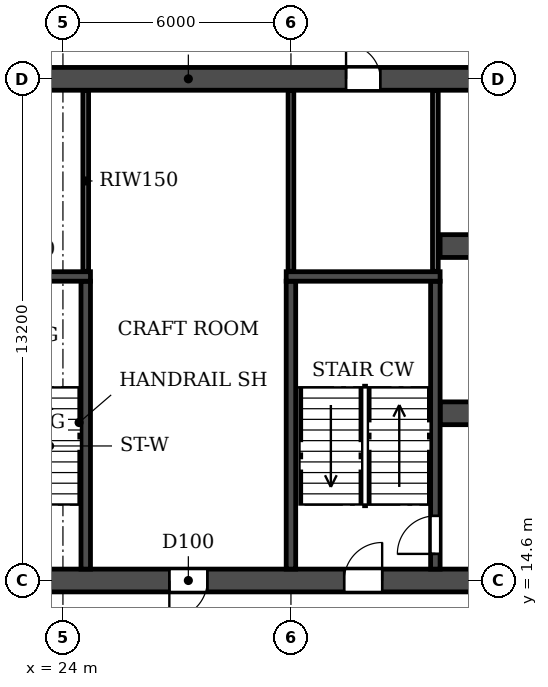
"""IFC4 building model, lengths in metres.
Left out: names, types, materials, properties, quantities, classifications, styles, units other than length and angle.
Written with IfcOpenShell. Run it as: python <this file> out.ifc"""

import sys

from ifc_helpers import new_model, si_unit, direction, frame, frame_2d, origin, place, context, subcontext, project, spatial, rectangle, extrude, element, fill, save


model = new_model("IFC4")
c1 = context("Model", 3, precision=1e-05, world=origin(), true_north=direction((0.0, 1.0)))
c2 = subcontext(c1, "Body", "Model", "MODEL_VIEW")
j1 = project(units=[si_unit("LENGTHUNIT", "METRE"), si_unit("PLANEANGLEUNIT", "RADIAN")], contexts=[c1])
p1 = place(None, origin())
s1 = spatial("IfcSite", under=j1, at=p1, CompositionType="ELEMENT")
p2 = place(p1, origin())
s2 = spatial("IfcBuilding", under=s1, at=p2, CompositionType="ELEMENT")
p3 = place(p2, frame((0.0, 0.0, 49.8)))
s3 = spatial("IfcBuildingStorey", under=s2, at=p3, CompositionType="ELEMENT", Elevation=49.8)
p4 = place(p3, frame((2.6, 14.6, 0.0), z_axis=(0.0, 0.0, 1.0), x_axis=(1.0, 0.0, 0.0)))
e1 = element("IfcWall", 1, at=p4, inside=s3, PredefinedType="SOLIDWALL", context=c2, shape_type="SweptSolid", body=[
    extrude(rectangle(XDim=96.8, YDim=0.6, at=frame_2d((48.4, 0.0))), origin(), (0.0, 0.0, 1.0), 3.0),
])
p5 = place(p4, frame((3.05, 0.0, 0.0)))
e2 = element("IfcOpeningElement", 2, at=p5, cuts=e1, PredefinedType="OPENING", context=c2, shape_type="SweptSolid", body=[
    extrude(rectangle(XDim=1.5, YDim=2.1, at=frame_2d((0.75, 1.05))), frame((0.0, 0.31, 0.0), z_axis=(0.0, -1.0, 0.0), x_axis=(1.0, 0.0, 0.0)), (0.0, 0.0, 1.0), 0.62),
])
p6 = place(p4, frame((10.75, 0.0, 0.0)))
e3 = element("IfcOpeningElement", 3, at=p6, cuts=e1, PredefinedType="OPENING", context=c2, shape_type="SweptSolid", body=[
    extrude(rectangle(XDim=1.5, YDim=2.1, at=frame_2d((0.75, 1.05))), frame((0.0, 0.31, 0.0), z_axis=(0.0, -1.0, 0.0), x_axis=(1.0, 0.0, 0.0)), (0.0, 0.0, 1.0), 0.62),
])
p7 = place(p4, frame((16.3, 0.0, 0.0)))
e4 = element("IfcOpeningElement", 4, at=p7, cuts=e1, PredefinedType="OPENING", context=c2, shape_type="SweptSolid", body=[
    extrude(rectangle(XDim=1.0, YDim=2.1, at=frame_2d((0.5, 1.05))), frame((0.0, 0.31, 0.0), z_axis=(0.0, -1.0, 0.0), x_axis=(1.0, 0.0, 0.0)), (0.0, 0.0, 1.0), 0.62),
])
p8 = place(p4, frame((24.2, 0.0, 0.0)))
e5 = element("IfcOpeningElement", 5, at=p8, cuts=e1, PredefinedType="OPENING", context=c2, shape_type="SweptSolid", body=[
    extrude(rectangle(XDim=1.0, YDim=2.1, at=frame_2d((0.5, 1.05))), frame((0.0, 0.31, 0.0), z_axis=(0.0, -1.0, 0.0), x_axis=(1.0, 0.0, 0.0)), (0.0, 0.0, 1.0), 0.62),
])
p9 = place(p4, frame((28.8, 0.0, 0.0)))
e6 = element("IfcOpeningElement", 6, at=p9, cuts=e1, PredefinedType="OPENING", context=c2, shape_type="SweptSolid", body=[
    extrude(rectangle(XDim=1.0, YDim=2.1, at=frame_2d((0.5, 1.05))), frame((0.0, 0.31, 0.0), z_axis=(0.0, -1.0, 0.0), x_axis=(1.0, 0.0, 0.0)), (0.0, 0.0, 1.0), 0.62),
])
p10 = place(p4, frame((42.7, 0.0, 0.0)))
e7 = element("IfcOpeningElement", 7, at=p10, cuts=e1, PredefinedType="OPENING", context=c2, shape_type="SweptSolid", body=[
    extrude(rectangle(XDim=1.0, YDim=2.1, at=frame_2d((0.5, 1.05))), frame((0.0, 0.31, 0.0), z_axis=(0.0, -1.0, 0.0), x_axis=(1.0, 0.0, 0.0)), (0.0, 0.0, 1.0), 0.62),
])
p11 = place(p4, frame((47.9, 0.0, 0.0)))
e8 = element("IfcOpeningElement", 8, at=p11, cuts=e1, PredefinedType="OPENING", context=c2, shape_type="SweptSolid", body=[
    extrude(rectangle(XDim=1.0, YDim=2.1, at=frame_2d((0.5, 1.05))), frame((0.0, 0.31, 0.0), z_axis=(0.0, -1.0, 0.0), x_axis=(1.0, 0.0, 0.0)), (0.0, 0.0, 1.0), 0.62),
])
p12 = place(p4, frame((51.8, 0.0, 0.0)))
e9 = element("IfcOpeningElement", 9, at=p12, cuts=e1, PredefinedType="OPENING", context=c2, shape_type="SweptSolid", body=[
    extrude(rectangle(XDim=1.0, YDim=2.1, at=frame_2d((0.5, 1.05))), frame((0.0, 0.31, 0.0), z_axis=(0.0, -1.0, 0.0), x_axis=(1.0, 0.0, 0.0)), (0.0, 0.0, 1.0), 0.62),
])
p13 = place(p4, frame((55.7, 0.0, 0.0)))
e10 = element("IfcOpeningElement", 10, at=p13, cuts=e1, PredefinedType="OPENING", context=c2, shape_type="SweptSolid", body=[
    extrude(rectangle(XDim=1.0, YDim=2.1, at=frame_2d((0.5, 1.05))), frame((0.0, 0.31, 0.0), z_axis=(0.0, -1.0, 0.0), x_axis=(1.0, 0.0, 0.0)), (0.0, 0.0, 1.0), 0.62),
])
p14 = place(p4, frame((67.0, 0.0, 0.0)))
e11 = element("IfcOpeningElement", 11, at=p14, cuts=e1, PredefinedType="OPENING", context=c2, shape_type="SweptSolid", body=[
    extrude(rectangle(XDim=1.0, YDim=2.1, at=frame_2d((0.5, 1.05))), frame((0.0, 0.31, 0.0), z_axis=(0.0, -1.0, 0.0), x_axis=(1.0, 0.0, 0.0)), (0.0, 0.0, 1.0), 0.62),
])
p15 = place(p4, frame((71.6, 0.0, 0.0)))
e12 = element("IfcOpeningElement", 12, at=p15, cuts=e1, PredefinedType="OPENING", context=c2, shape_type="SweptSolid", body=[
    extrude(rectangle(XDim=1.0, YDim=2.1, at=frame_2d((0.5, 1.05))), frame((0.0, 0.31, 0.0), z_axis=(0.0, -1.0, 0.0), x_axis=(1.0, 0.0, 0.0)), (0.0, 0.0, 1.0), 0.62),
])
p16 = place(p4, frame((79.5, 0.0, 0.0)))
e13 = element("IfcOpeningElement", 13, at=p16, cuts=e1, PredefinedType="OPENING", context=c2, shape_type="SweptSolid", body=[
    extrude(rectangle(XDim=1.0, YDim=2.1, at=frame_2d((0.5, 1.05))), frame((0.0, 0.31, 0.0), z_axis=(0.0, -1.0, 0.0), x_axis=(1.0, 0.0, 0.0)), (0.0, 0.0, 1.0), 0.62),
])
p17 = place(p4, frame((84.05, 0.0, 0.0)))
e14 = element("IfcOpeningElement", 14, at=p17, cuts=e1, PredefinedType="OPENING", context=c2, shape_type="SweptSolid", body=[
    extrude(rectangle(XDim=1.0, YDim=2.1, at=frame_2d((0.5, 1.05))), frame((0.0, 0.31, 0.0), z_axis=(0.0, -1.0, 0.0), x_axis=(1.0, 0.0, 0.0)), (0.0, 0.0, 1.0), 0.62),
])
p18 = place(p4, frame((91.75, 0.0, 0.0)))
e15 = element("IfcOpeningElement", 15, at=p18, cuts=e1, PredefinedType="OPENING", context=c2, shape_type="SweptSolid", body=[
    extrude(rectangle(XDim=1.0, YDim=2.1, at=frame_2d((0.5, 1.05))), frame((0.0, 0.31, 0.0), z_axis=(0.0, -1.0, 0.0), x_axis=(1.0, 0.0, 0.0)), (0.0, 0.0, 1.0), 0.62),
])
p19 = place(p3, frame((2.6, 27.8, 0.0), z_axis=(0.0, 0.0, 1.0), x_axis=(1.0, 0.0, 0.0)))
e16 = element("IfcWall", 16, at=p19, inside=s3, PredefinedType="SOLIDWALL", context=c2, shape_type="SweptSolid", body=[
    extrude(rectangle(XDim=96.8, YDim=0.6, at=frame_2d((48.4, 0.0))), origin(), (0.0, 0.0, 1.0), 3.0),
])
p20 = place(p19, frame((7.2, 0.0, 0.0)))
e17 = element("IfcOpeningElement", 17, at=p20, cuts=e16, PredefinedType="OPENING", context=c2, shape_type="SweptSolid", body=[
    extrude(rectangle(XDim=1.0, YDim=2.1, at=frame_2d((0.5, 1.05))), frame((0.0, 0.31, 0.0), z_axis=(0.0, -1.0, 0.0), x_axis=(1.0, 0.0, 0.0)), (0.0, 0.0, 1.0), 0.62),
])
p21 = place(p19, frame((16.3, 0.0, 0.0)))
e18 = element("IfcOpeningElement", 18, at=p21, cuts=e16, PredefinedType="OPENING", context=c2, shape_type="SweptSolid", body=[
    extrude(rectangle(XDim=1.0, YDim=2.1, at=frame_2d((0.5, 1.05))), frame((0.0, 0.31, 0.0), z_axis=(0.0, -1.0, 0.0), x_axis=(1.0, 0.0, 0.0)), (0.0, 0.0, 1.0), 0.62),
])
p22 = place(p19, frame((19.65, 0.0, 0.0)))
e19 = element("IfcOpeningElement", 19, at=p22, cuts=e16, PredefinedType="OPENING", context=c2, shape_type="SweptSolid", body=[
    extrude(rectangle(XDim=0.9, YDim=2.1, at=frame_2d((0.45, 1.05))), frame((0.0, 0.31, 0.0), z_axis=(0.0, -1.0, 0.0), x_axis=(1.0, 0.0, 0.0)), (0.0, 0.0, 1.0), 0.62),
])
p23 = place(p19, frame((28.85, 0.0, 0.0)))
e20 = element("IfcOpeningElement", 20, at=p23, cuts=e16, PredefinedType="OPENING", context=c2, shape_type="SweptSolid", body=[
    extrude(rectangle(XDim=0.9, YDim=2.1, at=frame_2d((0.45, 1.05))), frame((0.0, 0.31, 0.0), z_axis=(0.0, -1.0, 0.0), x_axis=(1.0, 0.0, 0.0)), (0.0, 0.0, 1.0), 0.62),
])
p24 = place(p19, frame((33.3, 0.0, 0.0)))
e21 = element("IfcOpeningElement", 21, at=p24, cuts=e16, PredefinedType="OPENING", context=c2, shape_type="SweptSolid", body=[
    extrude(rectangle(XDim=1.0, YDim=2.1, at=frame_2d((0.5, 1.05))), frame((0.0, 0.31, 0.0), z_axis=(0.0, -1.0, 0.0), x_axis=(1.0, 0.0, 0.0)), (0.0, 0.0, 1.0), 0.62),
])
p25 = place(p19, frame((38.25, 0.0, 0.0)))
e22 = element("IfcOpeningElement", 22, at=p25, cuts=e16, PredefinedType="OPENING", context=c2, shape_type="SweptSolid", body=[
    extrude(rectangle(XDim=1.5, YDim=2.1, at=frame_2d((0.75, 1.05))), frame((0.0, 0.31, 0.0), z_axis=(0.0, -1.0, 0.0), x_axis=(1.0, 0.0, 0.0)), (0.0, 0.0, 1.0), 0.62),
])
p26 = place(p19, frame((45.0, 0.0, 0.0)))
e23 = element("IfcOpeningElement", 23, at=p26, cuts=e16, PredefinedType="OPENING", context=c2, shape_type="SweptSolid", body=[
    extrude(rectangle(XDim=1.0, YDim=2.1, at=frame_2d((0.5, 1.05))), frame((0.0, 0.31, 0.0), z_axis=(0.0, -1.0, 0.0), x_axis=(1.0, 0.0, 0.0)), (0.0, 0.0, 1.0), 0.62),
])
p27 = place(p19, frame((47.9, 0.0, 0.0)))
e24 = element("IfcOpeningElement", 24, at=p27, cuts=e16, PredefinedType="OPENING", context=c2, shape_type="SweptSolid", body=[
    extrude(rectangle(XDim=1.0, YDim=2.1, at=frame_2d((0.5, 1.05))), frame((0.0, 0.31, 0.0), z_axis=(0.0, -1.0, 0.0), x_axis=(1.0, 0.0, 0.0)), (0.0, 0.0, 1.0), 0.62),
])
p28 = place(p19, frame((52.1, 0.0, 0.0)))
e25 = element("IfcOpeningElement", 25, at=p28, cuts=e16, PredefinedType="OPENING", context=c2, shape_type="SweptSolid", body=[
    extrude(rectangle(XDim=1.0, YDim=2.1, at=frame_2d((0.5, 1.05))), frame((0.0, 0.31, 0.0), z_axis=(0.0, -1.0, 0.0), x_axis=(1.0, 0.0, 0.0)), (0.0, 0.0, 1.0), 0.62),
])
p29 = place(p19, frame((56.0, 0.0, 0.0)))
e26 = element("IfcOpeningElement", 26, at=p29, cuts=e16, PredefinedType="OPENING", context=c2, shape_type="SweptSolid", body=[
    extrude(rectangle(XDim=1.0, YDim=2.1, at=frame_2d((0.5, 1.05))), frame((0.0, 0.31, 0.0), z_axis=(0.0, -1.0, 0.0), x_axis=(1.0, 0.0, 0.0)), (0.0, 0.0, 1.0), 0.62),
])
p30 = place(p19, frame((61.2, 0.0, 0.0)))
e27 = element("IfcOpeningElement", 27, at=p30, cuts=e16, PredefinedType="OPENING", context=c2, shape_type="SweptSolid", body=[
    extrude(rectangle(XDim=1.0, YDim=2.1, at=frame_2d((0.5, 1.05))), frame((0.0, 0.31, 0.0), z_axis=(0.0, -1.0, 0.0), x_axis=(1.0, 0.0, 0.0)), (0.0, 0.0, 1.0), 0.62),
])
p31 = place(p19, frame((67.05, 0.0, 0.0)))
e28 = element("IfcOpeningElement", 28, at=p31, cuts=e16, PredefinedType="OPENING", context=c2, shape_type="SweptSolid", body=[
    extrude(rectangle(XDim=0.9, YDim=2.1, at=frame_2d((0.45, 1.05))), frame((0.0, 0.31, 0.0), z_axis=(0.0, -1.0, 0.0), x_axis=(1.0, 0.0, 0.0)), (0.0, 0.0, 1.0), 0.62),
])
p32 = place(p19, frame((76.25, 0.0, 0.0)))
e29 = element("IfcOpeningElement", 29, at=p32, cuts=e16, PredefinedType="OPENING", context=c2, shape_type="SweptSolid", body=[
    extrude(rectangle(XDim=0.9, YDim=2.1, at=frame_2d((0.45, 1.05))), frame((0.0, 0.31, 0.0), z_axis=(0.0, -1.0, 0.0), x_axis=(1.0, 0.0, 0.0)), (0.0, 0.0, 1.0), 0.62),
])
p33 = place(p19, frame((79.5, 0.0, 0.0)))
e30 = element("IfcOpeningElement", 30, at=p33, cuts=e16, PredefinedType="OPENING", context=c2, shape_type="SweptSolid", body=[
    extrude(rectangle(XDim=1.0, YDim=2.1, at=frame_2d((0.5, 1.05))), frame((0.0, 0.31, 0.0), z_axis=(0.0, -1.0, 0.0), x_axis=(1.0, 0.0, 0.0)), (0.0, 0.0, 1.0), 0.62),
])
p34 = place(p19, frame((84.05, 0.0, 0.0)))
e31 = element("IfcOpeningElement", 31, at=p34, cuts=e16, PredefinedType="OPENING", context=c2, shape_type="SweptSolid", body=[
    extrude(rectangle(XDim=1.0, YDim=2.1, at=frame_2d((0.5, 1.05))), frame((0.0, 0.31, 0.0), z_axis=(0.0, -1.0, 0.0), x_axis=(1.0, 0.0, 0.0)), (0.0, 0.0, 1.0), 0.62),
])
p35 = place(p19, frame((91.75, 0.0, 0.0)))
e32 = element("IfcOpeningElement", 32, at=p35, cuts=e16, PredefinedType="OPENING", context=c2, shape_type="SweptSolid", body=[
    extrude(rectangle(XDim=1.0, YDim=2.1, at=frame_2d((0.5, 1.05))), frame((0.0, 0.31, 0.0), z_axis=(0.0, -1.0, 0.0), x_axis=(1.0, 0.0, 0.0)), (0.0, 0.0, 1.0), 0.62),
])
p36 = place(p3, frame((33.925, 19.0, 0.0), z_axis=(0.0, 0.0, 1.0), x_axis=(1.0, 0.0, 0.0)))
e33 = element("IfcWall", 33, at=p36, inside=s3, PredefinedType="SOLIDWALL", context=c2, shape_type="SweptSolid", body=[
    extrude(rectangle(XDim=34.15, YDim=0.6, at=frame_2d((17.075, 0.0))), origin(), (0.0, 0.0, 1.0), 3.0),
])
p37 = place(p36, frame((16.175, 0.0, 0.0)))
e34 = element("IfcOpeningElement", 34, at=p37, cuts=e33, PredefinedType="OPENING", context=c2, shape_type="SweptSolid", body=[
    extrude(rectangle(XDim=1.8, YDim=2.1, at=frame_2d((0.9, 1.05))), frame((0.0, 0.31, 0.0), z_axis=(0.0, -1.0, 0.0), x_axis=(1.0, 0.0, 0.0)), (0.0, 0.0, 1.0), 0.62),
])
p38 = place(p36, frame((1.525, 0.0, 0.0)))
e35 = element("IfcOpeningElement", 35, at=p38, cuts=e33, PredefinedType="OPENING", context=c2, shape_type="SweptSolid", body=[
    extrude(rectangle(XDim=1.8, YDim=2.1, at=frame_2d((0.9, 1.05))), frame((0.0, 0.31, 0.0), z_axis=(0.0, -1.0, 0.0), x_axis=(1.0, 0.0, 0.0)), (0.0, 0.0, 1.0), 0.62),
])
p39 = place(p36, frame((8.725, 0.0, 0.0)))
e36 = element("IfcOpeningElement", 36, at=p39, cuts=e33, PredefinedType="OPENING", context=c2, shape_type="SweptSolid", body=[
    extrude(rectangle(XDim=1.1, YDim=2.1, at=frame_2d((0.55, 1.05))), frame((0.0, 0.31, 0.0), z_axis=(0.0, -1.0, 0.0), x_axis=(1.0, 0.0, 0.0)), (0.0, 0.0, 1.0), 0.62),
])
p40 = place(p36, frame((11.325, 0.0, 0.0)))
e37 = element("IfcOpeningElement", 37, at=p40, cuts=e33, PredefinedType="OPENING", context=c2, shape_type="SweptSolid", body=[
    extrude(rectangle(XDim=1.1, YDim=2.1, at=frame_2d((0.55, 1.05))), frame((0.0, 0.31, 0.0), z_axis=(0.0, -1.0, 0.0), x_axis=(1.0, 0.0, 0.0)), (0.0, 0.0, 1.0), 0.62),
])
p41 = place(p36, frame((13.925, 0.0, 0.0)))
e38 = element("IfcOpeningElement", 38, at=p41, cuts=e33, PredefinedType="OPENING", context=c2, shape_type="SweptSolid", body=[
    extrude(rectangle(XDim=1.1, YDim=2.1, at=frame_2d((0.55, 1.05))), frame((0.0, 0.31, 0.0), z_axis=(0.0, -1.0, 0.0), x_axis=(1.0, 0.0, 0.0)), (0.0, 0.0, 1.0), 0.62),
])
p42 = place(p36, frame((19.125, 0.0, 0.0)))
e39 = element("IfcOpeningElement", 39, at=p42, cuts=e33, PredefinedType="OPENING", context=c2, shape_type="SweptSolid", body=[
    extrude(rectangle(XDim=1.1, YDim=2.1, at=frame_2d((0.55, 1.05))), frame((0.0, 0.31, 0.0), z_axis=(0.0, -1.0, 0.0), x_axis=(1.0, 0.0, 0.0)), (0.0, 0.0, 1.0), 0.62),
])
p43 = place(p36, frame((21.725, 0.0, 0.0)))
e40 = element("IfcOpeningElement", 40, at=p43, cuts=e33, PredefinedType="OPENING", context=c2, shape_type="SweptSolid", body=[
    extrude(rectangle(XDim=1.1, YDim=2.1, at=frame_2d((0.55, 1.05))), frame((0.0, 0.31, 0.0), z_axis=(0.0, -1.0, 0.0), x_axis=(1.0, 0.0, 0.0)), (0.0, 0.0, 1.0), 0.62),
])
p44 = place(p36, frame((24.325, 0.0, 0.0)))
e41 = element("IfcOpeningElement", 41, at=p44, cuts=e33, PredefinedType="OPENING", context=c2, shape_type="SweptSolid", body=[
    extrude(rectangle(XDim=1.1, YDim=2.1, at=frame_2d((0.55, 1.05))), frame((0.0, 0.31, 0.0), z_axis=(0.0, -1.0, 0.0), x_axis=(1.0, 0.0, 0.0)), (0.0, 0.0, 1.0), 0.62),
])
p45 = place(p36, frame((30.825, 0.0, 0.0)))
e42 = element("IfcOpeningElement", 42, at=p45, cuts=e33, PredefinedType="OPENING", context=c2, shape_type="SweptSolid", body=[
    extrude(rectangle(XDim=1.8, YDim=2.1, at=frame_2d((0.9, 1.05))), frame((0.0, 0.31, 0.0), z_axis=(0.0, -1.0, 0.0), x_axis=(1.0, 0.0, 0.0)), (0.0, 0.0, 1.0), 0.62),
])
p46 = place(p3, frame((33.925, 23.4, 0.0), z_axis=(0.0, 0.0, 1.0), x_axis=(1.0, 0.0, 0.0)))
e43 = element("IfcWall", 43, at=p46, inside=s3, PredefinedType="SOLIDWALL", context=c2, shape_type="SweptSolid", body=[
    extrude(rectangle(XDim=34.15, YDim=0.6, at=frame_2d((17.075, 0.0))), origin(), (0.0, 0.0, 1.0), 3.0),
])
p47 = place(p46, frame((16.175, 0.0, 0.0)))
e44 = element("IfcOpeningElement", 44, at=p47, cuts=e43, PredefinedType="OPENING", context=c2, shape_type="SweptSolid", body=[
    extrude(rectangle(XDim=1.8, YDim=2.1, at=frame_2d((0.9, 1.05))), frame((0.0, 0.31, 0.0), z_axis=(0.0, -1.0, 0.0), x_axis=(1.0, 0.0, 0.0)), (0.0, 0.0, 1.0), 0.62),
])
p48 = place(p46, frame((11.025, 0.0, 0.0)))
e45 = element("IfcOpeningElement", 45, at=p48, cuts=e43, PredefinedType="OPENING", context=c2, shape_type="SweptSolid", body=[
    extrude(rectangle(XDim=1.1, YDim=2.1, at=frame_2d((0.55, 1.05))), frame((0.0, 0.31, 0.0), z_axis=(0.0, -1.0, 0.0), x_axis=(1.0, 0.0, 0.0)), (0.0, 0.0, 1.0), 0.62),
])
p49 = place(p3, frame((30.0, 14.9, 0.0), z_axis=(0.0, 0.0, 1.0), x_axis=(0.0, 1.0, 0.0)))
e46 = element("IfcWall", 46, at=p49, inside=s3, PredefinedType="SOLIDWALL", context=c2, shape_type="SweptSolid", body=[
    extrude(rectangle(XDim=7.575, YDim=0.25, at=frame_2d((3.788, 0.0))), origin(), (0.0, 0.0, 1.0), 3.0),
])
p50 = place(p3, frame((33.8, 14.9, 0.0), z_axis=(0.0, 0.0, 1.0), x_axis=(0.0, 1.0, 0.0)))
e47 = element("IfcWall", 47, at=p50, inside=s3, PredefinedType="SOLIDWALL", context=c2, shape_type="SweptSolid", body=[
    extrude(rectangle(XDim=7.575, YDim=0.25, at=frame_2d((3.788, 0.0))), origin(), (0.0, 0.0, 1.0), 3.0),
])
p51 = place(p50, frame((0.4, 0.0, 0.0)))
e48 = element("IfcOpeningElement", 48, at=p51, cuts=e47, PredefinedType="OPENING", context=c2, shape_type="SweptSolid", body=[
    extrude(rectangle(XDim=1.0, YDim=2.1, at=frame_2d((0.5, 1.05))), frame((0.0, 0.135, 0.0), z_axis=(0.0, -1.0, 0.0), x_axis=(1.0, 0.0, 0.0)), (0.0, 0.0, 1.0), 0.27),
])
p52 = place(p3, frame((29.875, 22.6, 0.0), z_axis=(0.0, 0.0, 1.0), x_axis=(1.0, 0.0, 0.0)))
e49 = element("IfcWall", 49, at=p52, inside=s3, PredefinedType="SOLIDWALL", context=c2, shape_type="SweptSolid", body=[
    extrude(rectangle(XDim=4.05, YDim=0.25, at=frame_2d((2.025, 0.0))), origin(), (0.0, 0.0, 1.0), 3.0),
])
p53 = place(p3, frame((24.6, 14.9, 0.0), z_axis=(0.0, 0.0, 1.0), x_axis=(0.0, 1.0, 0.0)))
e50 = element("IfcWall", 50, at=p53, inside=s3, PredefinedType="SOLIDWALL", context=c2, shape_type="SweptSolid", body=[
    extrude(rectangle(XDim=7.575, YDim=0.25, at=frame_2d((3.788, 0.0))), origin(), (0.0, 0.0, 1.0), 3.0),
])
p54 = place(p3, frame((20.675, 22.6, 0.0), z_axis=(0.0, 0.0, 1.0), x_axis=(1.0, 0.0, 0.0)))
e51 = element("IfcWall", 51, at=p54, inside=s3, PredefinedType="SOLIDWALL", context=c2, shape_type="SweptSolid", body=[
    extrude(rectangle(XDim=4.05, YDim=0.25, at=frame_2d((2.025, 0.0))), origin(), (0.0, 0.0, 1.0), 3.0),
])
for number, where, z_axis, x_axis in (
    (52, (24.6, 22.735, 0.0), (0.0, 0.0, 1.0), (0.0, 1.0, 0.0)),
    (53, (30.0, 22.735, 0.0), (0.0, 0.0, 1.0), (0.0, 1.0, 0.0)),
    (54, (33.8, 22.735, 0.0), (0.0, 0.0, 1.0), (0.0, 1.0, 0.0)),
):
    element("IfcWall", number, at=place(p3, frame(where, z_axis=z_axis, x_axis=x_axis)), inside=s3, PredefinedType="PARTITIONING", context=c2, shape_type="SweptSolid", body=[
        extrude(rectangle(XDim=4.755, YDim=0.15, at=frame_2d((2.377, 0.0))), origin(), (0.0, 0.0, 1.0), 3.0),
    ])
p55 = place(p23, origin())
e55 = element("IfcDoor", 55, at=p55, inside=s3, OperationType="SINGLE_SWING_LEFT", PredefinedType="DOOR", context=c2, shape_type="SweptSolid", body=[
    extrude(rectangle(XDim=0.9, YDim=2.1, at=frame_2d((0.45, 1.05))), frame((0.0, 0.025, 0.0), z_axis=(0.0, -1.0, 0.0), x_axis=(1.0, 0.0, 0.0)), (0.0, 0.0, 1.0), 0.05),
])
fill(e20, e55)
p56 = place(p8, frame((1.0, 0.0, 0.0), z_axis=(0.0, 0.0, 1.0), x_axis=(-1.0, 0.0, 0.0)))
e56 = element("IfcDoor", 56, at=p56, inside=s3, OperationType="SINGLE_SWING_RIGHT", PredefinedType="DOOR", context=c2, shape_type="SweptSolid", body=[
    extrude(rectangle(XDim=1.0, YDim=2.1, at=frame_2d((0.5, 1.05))), frame((0.0, 0.025, 0.0), z_axis=(0.0, -1.0, 0.0), x_axis=(1.0, 0.0, 0.0)), (0.0, 0.0, 1.0), 0.05),
])
fill(e5, e56)
p57 = place(p9, origin())
e57 = element("IfcDoor", 57, at=p57, inside=s3, OperationType="SINGLE_SWING_RIGHT", PredefinedType="DOOR", context=c2, shape_type="SweptSolid", body=[
    extrude(rectangle(XDim=1.0, YDim=2.1, at=frame_2d((0.5, 1.05))), frame((0.0, 0.025, 0.0), z_axis=(0.0, -1.0, 0.0), x_axis=(1.0, 0.0, 0.0)), (0.0, 0.0, 1.0), 0.05),
])
fill(e6, e57)
p58 = place(p51, origin())
e58 = element("IfcDoor", 58, at=p58, inside=s3, OperationType="SINGLE_SWING_LEFT", PredefinedType="DOOR", context=c2, shape_type="SweptSolid", body=[
    extrude(rectangle(XDim=1.0, YDim=2.1, at=frame_2d((0.5, 1.05))), frame((0.0, 0.025, 0.0), z_axis=(0.0, -1.0, 0.0), x_axis=(1.0, 0.0, 0.0)), (0.0, 0.0, 1.0), 0.05),
])
fill(e48, e58)
save(model, sys.argv[1])
